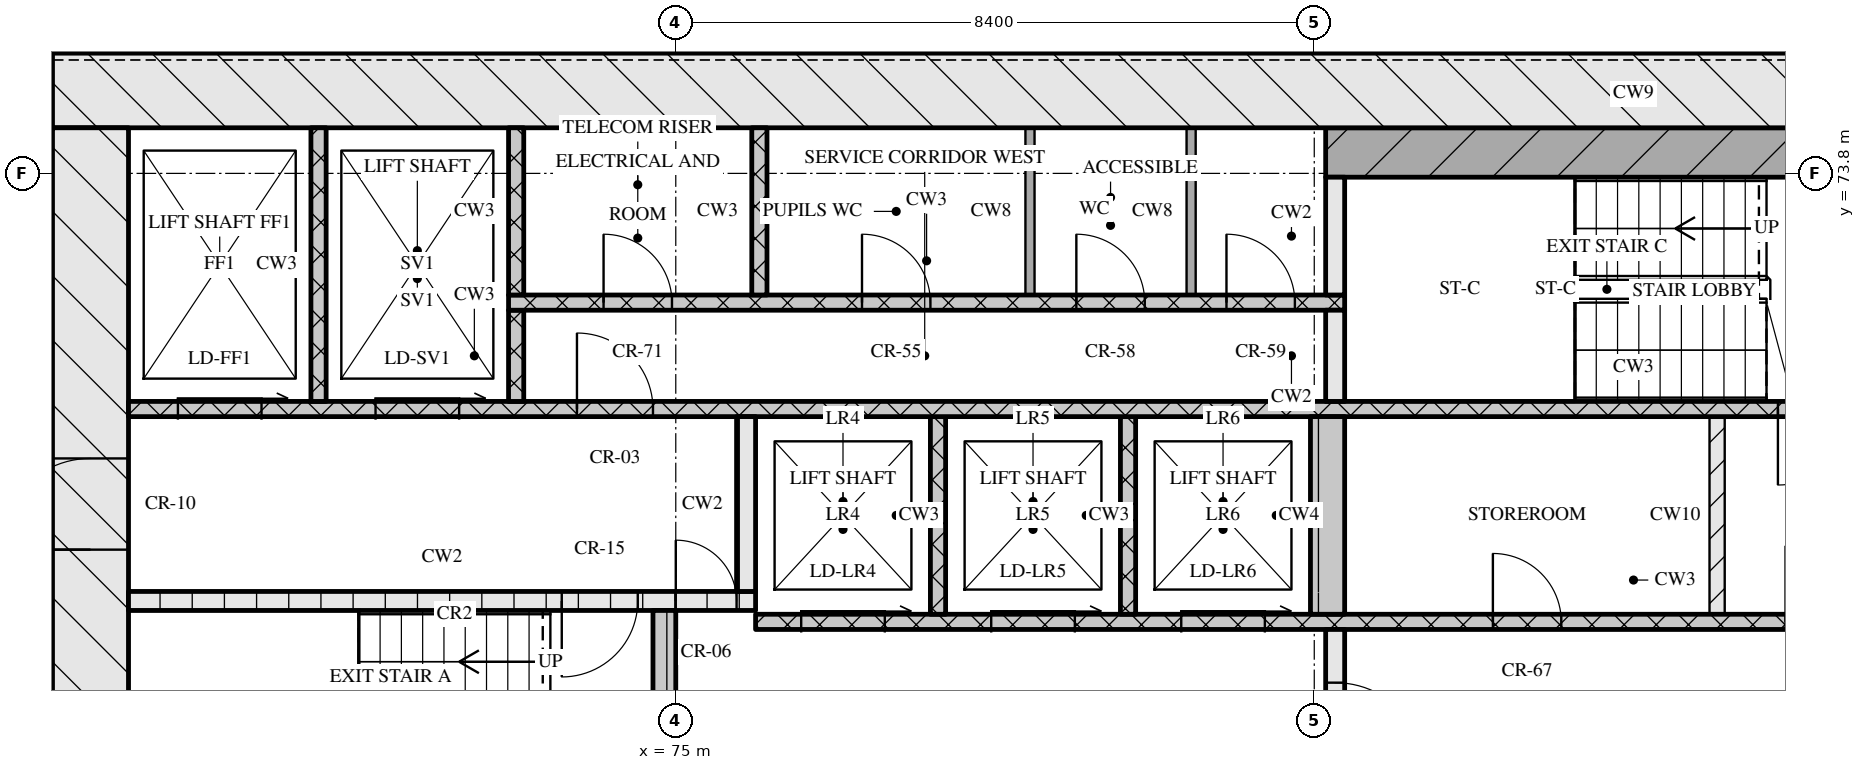
"""IFC4 building model, lengths in metres.
Left out: names, types, materials, properties, quantities, classifications, styles, units other than length and angle.
Written with IfcOpenShell. Run it as: python <this file> out.ifc"""

import sys

from ifc_helpers import new_model, si_unit, direction, frame, frame_2d, origin, place, context, subcontext, project, spatial, rectangle, extrude, element, fill, save


model = new_model("IFC4")
c1 = context("Model", 3, precision=1e-05, world=origin(), true_north=direction((0.0, 1.0)))
c2 = subcontext(c1, "Body", "Model", "MODEL_VIEW")
j1 = project(units=[si_unit("LENGTHUNIT", "METRE"), si_unit("PLANEANGLEUNIT", "RADIAN")], contexts=[c1])
p1 = place(None, origin())
s1 = spatial("IfcSite", under=j1, at=p1, CompositionType="ELEMENT")
p2 = place(p1, origin())
s2 = spatial("IfcBuilding", under=s1, at=p2, CompositionType="ELEMENT")
p3 = place(p2, frame((0.0, 0.0, 106.05)))
s3 = spatial("IfcBuildingStorey", under=s2, at=p3, CompositionType="ELEMENT", Elevation=106.05)
p4 = place(p3, frame((66.8, 74.9, 0.0), z_axis=(0.0, 0.0, 1.0), x_axis=(1.0, 0.0, 0.0)))
e1 = element("IfcWall", 1, at=p4, inside=s3, PredefinedType="SOLIDWALL", context=c2, shape_type="SweptSolid", body=[
    extrude(rectangle(XDim=41.6, YDim=1.0, at=frame_2d((20.8, 0.0))), origin(), (0.0, 0.0, 1.0), 3.32),
])
p5 = place(p3, frame((67.3, 62.4, 0.0), z_axis=(0.0, 0.0, 1.0), x_axis=(0.0, 1.0, 0.0)))
e2 = element("IfcWall", 2, at=p5, inside=s3, PredefinedType="SOLIDWALL", context=c2, shape_type="SweptSolid", body=[
    extrude(rectangle(XDim=12.0, YDim=1.0, at=frame_2d((6.0, 0.0))), origin(), (0.0, 0.0, 1.0), 3.32),
])
p6 = place(p5, frame((6.45, 0.0, 0.0)))
e3 = element("IfcOpeningElement", 3, at=p6, cuts=e2, PredefinedType="OPENING", context=c2, shape_type="SweptSolid", body=[
    extrude(rectangle(XDim=1.2, YDim=2.1, at=frame_2d((0.6, 1.05))), frame((0.0, 0.51, 0.0), z_axis=(0.0, -1.0, 0.0), x_axis=(1.0, 0.0, 0.0)), (0.0, 0.0, 1.0), 1.02),
])
p7 = place(p3, frame((74.85, 65.2, 0.0), z_axis=(0.0, 0.0, 1.0), x_axis=(0.0, 1.0, 0.0)))
e4 = element("IfcWall", 4, at=p7, inside=s3, PredefinedType="SOLIDWALL", context=c2, shape_type="SweptSolid", body=[
    extrude(rectangle(XDim=2.85, YDim=0.3, at=frame_2d((1.425, 0.0))), origin(), (0.0, 0.0, 1.0), 3.32),
])
p8 = place(p3, frame((83.675, 65.2, 0.0), z_axis=(0.0, 0.0, 1.0), x_axis=(0.0, 1.0, 0.0)))
e5 = element("IfcWall", 5, at=p8, inside=s3, PredefinedType="SOLIDWALL", context=c2, shape_type="SweptSolid", body=[
    extrude(rectangle(XDim=2.6, YDim=0.25, at=frame_2d((1.3, 0.0))), origin(), (0.0, 0.0, 1.0), 3.32),
])
p9 = place(p8, frame((0.7, 0.0, 0.0)))
e6 = element("IfcOpeningElement", 6, at=p9, cuts=e5, PredefinedType="OPENING", context=c2, shape_type="SweptSolid", body=[
    extrude(rectangle(XDim=1.2, YDim=2.1, at=frame_2d((0.6, 1.05))), frame((0.0, 0.135, 0.0), z_axis=(0.0, -1.0, 0.0), x_axis=(1.0, 0.0, 0.0)), (0.0, 0.0, 1.0), 0.27),
])
p10 = place(p3, frame((76.05, 67.9, 0.0), z_axis=(0.0, 0.0, 1.0), x_axis=(1.0, 0.0, 0.0)))
e7 = element("IfcWall", 7, at=p10, inside=s3, PredefinedType="SOLIDWALL", context=c2, shape_type="SweptSolid", body=[
    extrude(rectangle(XDim=23.1, YDim=0.2, at=frame_2d((11.55, 0.0))), origin(), (0.0, 0.0, 1.0), 3.32),
])
p11 = place(p10, frame((0.6, 0.0, 0.0)))
e8 = element("IfcOpeningElement", 8, at=p11, cuts=e7, PredefinedType="OPENING", context=c2, shape_type="SweptSolid", body=[
    extrude(rectangle(XDim=1.1, YDim=2.1, at=frame_2d((0.55, 1.05))), frame((0.0, 0.11, 0.0), z_axis=(0.0, -1.0, 0.0), x_axis=(1.0, 0.0, 0.0)), (0.0, 0.0, 1.0), 0.22),
])
p12 = place(p10, frame((3.1, 0.0, 0.0)))
e9 = element("IfcOpeningElement", 9, at=p12, cuts=e7, PredefinedType="OPENING", context=c2, shape_type="SweptSolid", body=[
    extrude(rectangle(XDim=1.1, YDim=2.1, at=frame_2d((0.55, 1.05))), frame((0.0, 0.11, 0.0), z_axis=(0.0, -1.0, 0.0), x_axis=(1.0, 0.0, 0.0)), (0.0, 0.0, 1.0), 0.22),
])
p13 = place(p10, frame((5.6, 0.0, 0.0)))
e10 = element("IfcOpeningElement", 10, at=p13, cuts=e7, PredefinedType="OPENING", context=c2, shape_type="SweptSolid", body=[
    extrude(rectangle(XDim=1.1, YDim=2.1, at=frame_2d((0.55, 1.05))), frame((0.0, 0.11, 0.0), z_axis=(0.0, -1.0, 0.0), x_axis=(1.0, 0.0, 0.0)), (0.0, 0.0, 1.0), 0.22),
])
p14 = place(p10, frame((9.7, 0.0, 0.0)))
e11 = element("IfcOpeningElement", 11, at=p14, cuts=e7, PredefinedType="OPENING", context=c2, shape_type="SweptSolid", body=[
    extrude(rectangle(XDim=0.9, YDim=2.1, at=frame_2d((0.45, 1.05))), frame((0.0, 0.11, 0.0), z_axis=(0.0, -1.0, 0.0), x_axis=(1.0, 0.0, 0.0)), (0.0, 0.0, 1.0), 0.22),
])
p15 = place(p10, frame((13.55, 0.0, 0.0)))
e12 = element("IfcOpeningElement", 12, at=p15, cuts=e7, PredefinedType="OPENING", context=c2, shape_type="SweptSolid", body=[
    extrude(rectangle(XDim=1.0, YDim=2.1, at=frame_2d((0.5, 1.05))), frame((0.0, 0.11, 0.0), z_axis=(0.0, -1.0, 0.0), x_axis=(1.0, 0.0, 0.0)), (0.0, 0.0, 1.0), 0.22),
])
for number, where, z_axis, x_axis in (
    (13, (78.45, 68.0, 0.0), (0.0, 0.0, 1.0), (0.0, 1.0, 0.0)),
    (14, (80.95, 68.0, 0.0), (0.0, 0.0, 1.0), (0.0, 1.0, 0.0)),
):
    element("IfcWall", number, at=place(p3, frame(where, z_axis=z_axis, x_axis=x_axis)), inside=s3, PredefinedType="SOLIDWALL", context=c2, shape_type="SweptSolid", body=[
        extrude(rectangle(XDim=2.6, YDim=0.2, at=frame_2d((1.3, 0.0))), origin(), (0.0, 0.0, 1.0), 3.32),
    ])
p16 = place(p3, frame((83.575, 68.0, 0.0), z_axis=(0.0, 0.0, 1.0), x_axis=(0.0, 1.0, 0.0)))
e15 = element("IfcWall", 15, at=p16, inside=s3, PredefinedType="SOLIDWALL", context=c2, shape_type="SweptSolid", body=[
    extrude(rectangle(XDim=2.6, YDim=0.45, at=frame_2d((1.3, 0.0))), origin(), (0.0, 0.0, 1.0), 3.32),
])
p17 = place(p3, frame((88.7, 68.0, 0.0), z_axis=(0.0, 0.0, 1.0), x_axis=(0.0, 1.0, 0.0)))
e16 = element("IfcWall", 16, at=p17, inside=s3, PredefinedType="PARTITIONING", context=c2, shape_type="SweptSolid", body=[
    extrude(rectangle(XDim=2.6, YDim=0.2, at=frame_2d((1.3, 0.0))), origin(), (0.0, 0.0, 1.0), 3.32),
])
p18 = place(p3, frame((67.8, 68.175, 0.0), z_axis=(0.0, 0.0, 1.0), x_axis=(1.0, 0.0, 0.0)))
e17 = element("IfcWall", 17, at=p18, inside=s3, PredefinedType="SOLIDWALL", context=c2, shape_type="SweptSolid", body=[
    extrude(rectangle(XDim=8.25, YDim=0.25, at=frame_2d((4.125, 0.0))), origin(), (0.0, 0.0, 1.0), 3.32),
])
p19 = place(p18, frame((5.7, 0.0, 0.0)))
e18 = element("IfcOpeningElement", 18, at=p19, cuts=e17, PredefinedType="OPENING", context=c2, shape_type="SweptSolid", body=[
    extrude(rectangle(XDim=1.0, YDim=2.1, at=frame_2d((0.5, 1.05))), frame((0.0, 0.135, 0.0), z_axis=(0.0, -1.0, 0.0), x_axis=(1.0, 0.0, 0.0)), (0.0, 0.0, 1.0), 0.27),
])
p20 = place(p18, frame((7.2, 0.0, 0.0)))
e19 = element("IfcOpeningElement", 19, at=p20, cuts=e17, PredefinedType="OPENING", context=c2, shape_type="SweptSolid", body=[
    extrude(rectangle(XDim=0.8, YDim=2.1, at=frame_2d((0.4, 1.05))), frame((0.0, 0.135, 0.0), z_axis=(0.0, -1.0, 0.0), x_axis=(1.0, 0.0, 0.0)), (0.0, 0.0, 1.0), 0.27),
])
p21 = place(p3, frame((75.925, 68.3, 0.0), z_axis=(0.0, 0.0, 1.0), x_axis=(0.0, 1.0, 0.0)))
e20 = element("IfcWall", 20, at=p21, inside=s3, PredefinedType="SOLIDWALL", context=c2, shape_type="SweptSolid", body=[
    extrude(rectangle(XDim=2.3, YDim=0.25, at=frame_2d((1.15, 0.0))), origin(), (0.0, 0.0, 1.0), 3.32),
])
p22 = place(p3, frame((67.8, 70.7, 0.0), z_axis=(0.0, 0.0, 1.0), x_axis=(1.0, 0.0, 0.0)))
e21 = element("IfcWall", 21, at=p22, inside=s3, PredefinedType="SOLIDWALL", context=c2, shape_type="SweptSolid", body=[
    extrude(rectangle(XDim=39.6, YDim=0.2, at=frame_2d((19.8, 0.0))), origin(), (0.0, 0.0, 1.0), 3.32),
])
p23 = place(p22, frame((0.65, 0.0, 0.0)))
e22 = element("IfcOpeningElement", 22, at=p23, cuts=e21, PredefinedType="OPENING", context=c2, shape_type="SweptSolid", body=[
    extrude(rectangle(XDim=1.1, YDim=2.1, at=frame_2d((0.55, 1.05))), frame((0.0, 0.11, 0.0), z_axis=(0.0, -1.0, 0.0), x_axis=(1.0, 0.0, 0.0)), (0.0, 0.0, 1.0), 0.22),
])
p24 = place(p22, frame((3.25, 0.0, 0.0)))
e23 = element("IfcOpeningElement", 23, at=p24, cuts=e21, PredefinedType="OPENING", context=c2, shape_type="SweptSolid", body=[
    extrude(rectangle(XDim=1.1, YDim=2.1, at=frame_2d((0.55, 1.05))), frame((0.0, 0.11, 0.0), z_axis=(0.0, -1.0, 0.0), x_axis=(1.0, 0.0, 0.0)), (0.0, 0.0, 1.0), 0.22),
])
p25 = place(p22, frame((5.9, 0.0, 0.0)))
e24 = element("IfcOpeningElement", 24, at=p25, cuts=e21, PredefinedType="OPENING", context=c2, shape_type="SweptSolid", body=[
    extrude(rectangle(XDim=1.0, YDim=2.1, at=frame_2d((0.5, 1.05))), frame((0.0, 0.11, 0.0), z_axis=(0.0, -1.0, 0.0), x_axis=(1.0, 0.0, 0.0)), (0.0, 0.0, 1.0), 0.22),
])
p26 = place(p22, frame((21.7, 0.0, 0.0)))
e25 = element("IfcOpeningElement", 25, at=p26, cuts=e21, PredefinedType="OPENING", context=c2, shape_type="SweptSolid", body=[
    extrude(rectangle(XDim=1.0, YDim=2.1, at=frame_2d((0.5, 1.05))), frame((0.0, 0.11, 0.0), z_axis=(0.0, -1.0, 0.0), x_axis=(1.0, 0.0, 0.0)), (0.0, 0.0, 1.0), 0.22),
])
p27 = place(p22, frame((32.7, 0.0, 0.0)))
e26 = element("IfcOpeningElement", 26, at=p27, cuts=e21, PredefinedType="OPENING", context=c2, shape_type="SweptSolid", body=[
    extrude(rectangle(XDim=1.0, YDim=2.1, at=frame_2d((0.5, 1.05))), frame((0.0, 0.11, 0.0), z_axis=(0.0, -1.0, 0.0), x_axis=(1.0, 0.0, 0.0)), (0.0, 0.0, 1.0), 0.22),
])
p28 = place(p22, frame((35.25, 0.0, 0.0)))
e27 = element("IfcOpeningElement", 27, at=p28, cuts=e21, PredefinedType="OPENING", context=c2, shape_type="SweptSolid", body=[
    extrude(rectangle(XDim=1.1, YDim=2.1, at=frame_2d((0.55, 1.05))), frame((0.0, 0.11, 0.0), z_axis=(0.0, -1.0, 0.0), x_axis=(1.0, 0.0, 0.0)), (0.0, 0.0, 1.0), 0.22),
])
p29 = place(p22, frame((37.85, 0.0, 0.0)))
e28 = element("IfcOpeningElement", 28, at=p29, cuts=e21, PredefinedType="OPENING", context=c2, shape_type="SweptSolid", body=[
    extrude(rectangle(XDim=1.1, YDim=2.1, at=frame_2d((0.55, 1.05))), frame((0.0, 0.11, 0.0), z_axis=(0.0, -1.0, 0.0), x_axis=(1.0, 0.0, 0.0)), (0.0, 0.0, 1.0), 0.22),
])
p30 = place(p3, frame((70.3, 70.8, 0.0), z_axis=(0.0, 0.0, 1.0), x_axis=(0.0, 1.0, 0.0)))
e29 = element("IfcWall", 29, at=p30, inside=s3, PredefinedType="SOLIDWALL", context=c2, shape_type="SweptSolid", body=[
    extrude(rectangle(XDim=3.6, YDim=0.2, at=frame_2d((1.8, 0.0))), origin(), (0.0, 0.0, 1.0), 3.32),
])
p31 = place(p3, frame((72.9, 70.8, 0.0), z_axis=(0.0, 0.0, 1.0), x_axis=(0.0, 1.0, 0.0)))
e30 = element("IfcWall", 30, at=p31, inside=s3, PredefinedType="SOLIDWALL", context=c2, shape_type="SweptSolid", body=[
    extrude(rectangle(XDim=1.2, YDim=0.2, at=frame_2d((0.6, 0.0))), origin(), (0.0, 0.0, 1.0), 3.32),
])
p32 = place(p3, frame((83.675, 70.8, 0.0), z_axis=(0.0, 0.0, 1.0), x_axis=(0.0, 1.0, 0.0)))
e31 = element("IfcWall", 31, at=p32, inside=s3, PredefinedType="SOLIDWALL", context=c2, shape_type="SweptSolid", body=[
    extrude(rectangle(XDim=1.2, YDim=0.25, at=frame_2d((0.6, 0.0))), origin(), (0.0, 0.0, 1.0), 3.32),
])
p33 = place(p3, frame((72.8, 72.1, 0.0), z_axis=(0.0, 0.0, 1.0), x_axis=(1.0, 0.0, 0.0)))
e32 = element("IfcWall", 32, at=p33, inside=s3, PredefinedType="SOLIDWALL", context=c2, shape_type="SweptSolid", body=[
    extrude(rectangle(XDim=11.0, YDim=0.2, at=frame_2d((5.5, 0.0))), origin(), (0.0, 0.0, 1.0), 3.32),
])
p34 = place(p33, frame((1.25, 0.0, 0.0)))
e33 = element("IfcOpeningElement", 33, at=p34, cuts=e32, PredefinedType="OPENING", context=c2, shape_type="SweptSolid", body=[
    extrude(rectangle(XDim=0.9, YDim=2.1, at=frame_2d((0.45, 1.05))), frame((0.0, 0.11, 0.0), z_axis=(0.0, -1.0, 0.0), x_axis=(1.0, 0.0, 0.0)), (0.0, 0.0, 1.0), 0.22),
])
p35 = place(p33, frame((4.65, 0.0, 0.0)))
e34 = element("IfcOpeningElement", 34, at=p35, cuts=e32, PredefinedType="OPENING", context=c2, shape_type="SweptSolid", body=[
    extrude(rectangle(XDim=0.9, YDim=2.1, at=frame_2d((0.45, 1.05))), frame((0.0, 0.11, 0.0), z_axis=(0.0, -1.0, 0.0), x_axis=(1.0, 0.0, 0.0)), (0.0, 0.0, 1.0), 0.22),
])
p36 = place(p33, frame((7.47, 0.0, 0.0)))
e35 = element("IfcOpeningElement", 35, at=p36, cuts=e32, PredefinedType="OPENING", context=c2, shape_type="SweptSolid", body=[
    extrude(rectangle(XDim=0.9, YDim=2.1, at=frame_2d((0.45, 1.05))), frame((0.0, 0.11, 0.0), z_axis=(0.0, -1.0, 0.0), x_axis=(1.0, 0.0, 0.0)), (0.0, 0.0, 1.0), 0.22),
])
p37 = place(p33, frame((9.445, 0.0, 0.0)))
e36 = element("IfcOpeningElement", 36, at=p37, cuts=e32, PredefinedType="OPENING", context=c2, shape_type="SweptSolid", body=[
    extrude(rectangle(XDim=0.9, YDim=2.1, at=frame_2d((0.45, 1.05))), frame((0.0, 0.11, 0.0), z_axis=(0.0, -1.0, 0.0), x_axis=(1.0, 0.0, 0.0)), (0.0, 0.0, 1.0), 0.22),
])
for number, where, z_axis, x_axis in (
    (37, (72.9, 72.2, 0.0), (0.0, 0.0, 1.0), (0.0, 1.0, 0.0)),
    (38, (76.1, 72.2, 0.0), (0.0, 0.0, 1.0), (0.0, 1.0, 0.0)),
):
    element("IfcWall", number, at=place(p3, frame(where, z_axis=z_axis, x_axis=x_axis)), inside=s3, PredefinedType="SOLIDWALL", context=c2, shape_type="SweptSolid", body=[
        extrude(rectangle(XDim=2.2, YDim=0.2, at=frame_2d((1.1, 0.0))), origin(), (0.0, 0.0, 1.0), 3.32),
    ])
for number, where, z_axis, x_axis in (
    (39, (79.66, 72.2, 0.0), (0.0, 0.0, 1.0), (0.0, 1.0, 0.0)),
    (40, (81.78, 72.2, 0.0), (0.0, 0.0, 1.0), (0.0, 1.0, 0.0)),
):
    element("IfcWall", number, at=place(p3, frame(where, z_axis=z_axis, x_axis=x_axis)), inside=s3, PredefinedType="PARTITIONING", context=c2, shape_type="SweptSolid", body=[
        extrude(rectangle(XDim=2.2, YDim=0.12, at=frame_2d((1.1, 0.0))), origin(), (0.0, 0.0, 1.0), 3.32),
    ])
p38 = place(p3, frame((83.675, 72.2, 0.0), z_axis=(0.0, 0.0, 1.0), x_axis=(0.0, 1.0, 0.0)))
e41 = element("IfcWall", 41, at=p38, inside=s3, PredefinedType="SOLIDWALL", context=c2, shape_type="SweptSolid", body=[
    extrude(rectangle(XDim=1.55, YDim=0.25, at=frame_2d((0.775, 0.0))), origin(), (0.0, 0.0, 1.0), 3.32),
])
p39 = place(p3, frame((83.55, 74.075, 0.0), z_axis=(0.0, 0.0, 1.0), x_axis=(1.0, 0.0, 0.0)))
e42 = element("IfcWall", 42, at=p39, inside=s3, PredefinedType="SOLIDWALL", context=c2, shape_type="SweptSolid", body=[
    extrude(rectangle(XDim=8.1, YDim=0.65, at=frame_2d((4.05, 0.0))), origin(), (0.0, 0.0, 1.0), 3.32),
])
p40 = place(p9, origin())
e43 = element("IfcDoor", 43, at=p40, inside=s3, OperationType="SINGLE_SWING_RIGHT", PredefinedType="DOOR", context=c2, shape_type="SweptSolid", body=[
    extrude(rectangle(XDim=1.2, YDim=2.1, at=frame_2d((0.6, 1.05))), frame((0.0, 0.025, 0.0), z_axis=(0.0, -1.0, 0.0), x_axis=(1.0, 0.0, 0.0)), (0.0, 0.0, 1.0), 0.05),
])
fill(e6, e43)
p41 = place(p11, origin())
e44 = element("IfcDoor", 44, at=p41, inside=s3, OperationType="SLIDING_TO_RIGHT", PredefinedType="DOOR", context=c2, shape_type="SweptSolid", body=[
    extrude(rectangle(XDim=1.1, YDim=2.1, at=frame_2d((0.55, 1.05))), frame((0.0, 0.025, 0.0), z_axis=(0.0, -1.0, 0.0), x_axis=(1.0, 0.0, 0.0)), (0.0, 0.0, 1.0), 0.05),
])
fill(e8, e44)
p42 = place(p12, origin())
e45 = element("IfcDoor", 45, at=p42, inside=s3, OperationType="SLIDING_TO_RIGHT", PredefinedType="DOOR", context=c2, shape_type="SweptSolid", body=[
    extrude(rectangle(XDim=1.1, YDim=2.1, at=frame_2d((0.55, 1.05))), frame((0.0, 0.025, 0.0), z_axis=(0.0, -1.0, 0.0), x_axis=(1.0, 0.0, 0.0)), (0.0, 0.0, 1.0), 0.05),
])
fill(e9, e45)
p43 = place(p13, origin())
e46 = element("IfcDoor", 46, at=p43, inside=s3, OperationType="SLIDING_TO_RIGHT", PredefinedType="DOOR", context=c2, shape_type="SweptSolid", body=[
    extrude(rectangle(XDim=1.1, YDim=2.1, at=frame_2d((0.55, 1.05))), frame((0.0, 0.025, 0.0), z_axis=(0.0, -1.0, 0.0), x_axis=(1.0, 0.0, 0.0)), (0.0, 0.0, 1.0), 0.05),
])
fill(e10, e46)
p44 = place(p14, origin())
e47 = element("IfcDoor", 47, at=p44, inside=s3, OperationType="SINGLE_SWING_LEFT", PredefinedType="DOOR", context=c2, shape_type="SweptSolid", body=[
    extrude(rectangle(XDim=0.9, YDim=2.1, at=frame_2d((0.45, 1.05))), frame((0.0, 0.025, 0.0), z_axis=(0.0, -1.0, 0.0), x_axis=(1.0, 0.0, 0.0)), (0.0, 0.0, 1.0), 0.05),
])
fill(e11, e47)
p45 = place(p19, origin())
e48 = element("IfcDoor", 48, at=p45, inside=s3, OperationType="SINGLE_SWING_RIGHT", PredefinedType="DOOR", context=c2, shape_type="SweptSolid", body=[
    extrude(rectangle(XDim=1.0, YDim=2.1, at=frame_2d((0.5, 1.05))), frame((0.0, 0.025, 0.0), z_axis=(0.0, -1.0, 0.0), x_axis=(1.0, 0.0, 0.0)), (0.0, 0.0, 1.0), 0.05),
])
fill(e18, e48)
p46 = place(p20, origin())
e49 = element("IfcDoor", 49, at=p46, inside=s3, OperationType="SINGLE_SWING_LEFT", PredefinedType="DOOR", context=c2, shape_type="SweptSolid", body=[
    extrude(rectangle(XDim=0.8, YDim=2.1, at=frame_2d((0.4, 1.05))), frame((0.0, 0.025, 0.0), z_axis=(0.0, -1.0, 0.0), x_axis=(1.0, 0.0, 0.0)), (0.0, 0.0, 1.0), 0.05),
])
fill(e19, e49)
p47 = place(p6, origin())
e50 = element("IfcDoor", 50, at=p47, inside=s3, OperationType="SINGLE_SWING_LEFT", PredefinedType="DOOR", context=c2, shape_type="SweptSolid", body=[
    extrude(rectangle(XDim=1.2, YDim=2.1, at=frame_2d((0.6, 1.05))), frame((0.0, 0.025, 0.0), z_axis=(0.0, -1.0, 0.0), x_axis=(1.0, 0.0, 0.0)), (0.0, 0.0, 1.0), 0.05),
])
fill(e3, e50)
p48 = place(p23, origin())
e51 = element("IfcDoor", 51, at=p48, inside=s3, OperationType="SLIDING_TO_RIGHT", PredefinedType="DOOR", context=c2, shape_type="SweptSolid", body=[
    extrude(rectangle(XDim=1.1, YDim=2.1, at=frame_2d((0.55, 1.05))), frame((0.0, 0.025, 0.0), z_axis=(0.0, -1.0, 0.0), x_axis=(1.0, 0.0, 0.0)), (0.0, 0.0, 1.0), 0.05),
])
fill(e22, e51)
p49 = place(p24, origin())
e52 = element("IfcDoor", 52, at=p49, inside=s3, OperationType="SLIDING_TO_RIGHT", PredefinedType="DOOR", context=c2, shape_type="SweptSolid", body=[
    extrude(rectangle(XDim=1.1, YDim=2.1, at=frame_2d((0.55, 1.05))), frame((0.0, 0.025, 0.0), z_axis=(0.0, -1.0, 0.0), x_axis=(1.0, 0.0, 0.0)), (0.0, 0.0, 1.0), 0.05),
])
fill(e23, e52)
p50 = place(p25, origin())
e53 = element("IfcDoor", 53, at=p50, inside=s3, OperationType="SINGLE_SWING_LEFT", PredefinedType="DOOR", context=c2, shape_type="SweptSolid", body=[
    extrude(rectangle(XDim=1.0, YDim=2.1, at=frame_2d((0.5, 1.05))), frame((0.0, 0.025, 0.0), z_axis=(0.0, -1.0, 0.0), x_axis=(1.0, 0.0, 0.0)), (0.0, 0.0, 1.0), 0.05),
])
fill(e24, e53)
p51 = place(p26, origin())
e54 = element("IfcDoor", 54, at=p51, inside=s3, OperationType="SINGLE_SWING_RIGHT", PredefinedType="DOOR", context=c2, shape_type="SweptSolid", body=[
    extrude(rectangle(XDim=1.0, YDim=2.1, at=frame_2d((0.5, 1.05))), frame((0.0, 0.025, 0.0), z_axis=(0.0, -1.0, 0.0), x_axis=(1.0, 0.0, 0.0)), (0.0, 0.0, 1.0), 0.05),
])
fill(e25, e54)
p52 = place(p34, origin())
e55 = element("IfcDoor", 55, at=p52, inside=s3, OperationType="SINGLE_SWING_LEFT", PredefinedType="DOOR", context=c2, shape_type="SweptSolid", body=[
    extrude(rectangle(XDim=0.9, YDim=2.1, at=frame_2d((0.45, 1.05))), frame((0.0, 0.025, 0.0), z_axis=(0.0, -1.0, 0.0), x_axis=(1.0, 0.0, 0.0)), (0.0, 0.0, 1.0), 0.05),
])
fill(e33, e55)
p53 = place(p35, origin())
e56 = element("IfcDoor", 56, at=p53, inside=s3, OperationType="SINGLE_SWING_LEFT", PredefinedType="DOOR", context=c2, shape_type="SweptSolid", body=[
    extrude(rectangle(XDim=0.9, YDim=2.1, at=frame_2d((0.45, 1.05))), frame((0.0, 0.025, 0.0), z_axis=(0.0, -1.0, 0.0), x_axis=(1.0, 0.0, 0.0)), (0.0, 0.0, 1.0), 0.05),
])
fill(e34, e56)
p54 = place(p36, origin())
e57 = element("IfcDoor", 57, at=p54, inside=s3, OperationType="SINGLE_SWING_LEFT", PredefinedType="DOOR", context=c2, shape_type="SweptSolid", body=[
    extrude(rectangle(XDim=0.9, YDim=2.1, at=frame_2d((0.45, 1.05))), frame((0.0, 0.025, 0.0), z_axis=(0.0, -1.0, 0.0), x_axis=(1.0, 0.0, 0.0)), (0.0, 0.0, 1.0), 0.05),
])
fill(e35, e57)
p55 = place(p37, origin())
e58 = element("IfcDoor", 58, at=p55, inside=s3, OperationType="SINGLE_SWING_LEFT", PredefinedType="DOOR", context=c2, shape_type="SweptSolid", body=[
    extrude(rectangle(XDim=0.9, YDim=2.1, at=frame_2d((0.45, 1.05))), frame((0.0, 0.025, 0.0), z_axis=(0.0, -1.0, 0.0), x_axis=(1.0, 0.0, 0.0)), (0.0, 0.0, 1.0), 0.05),
])
fill(e36, e58)
save(model, sys.argv[1])
